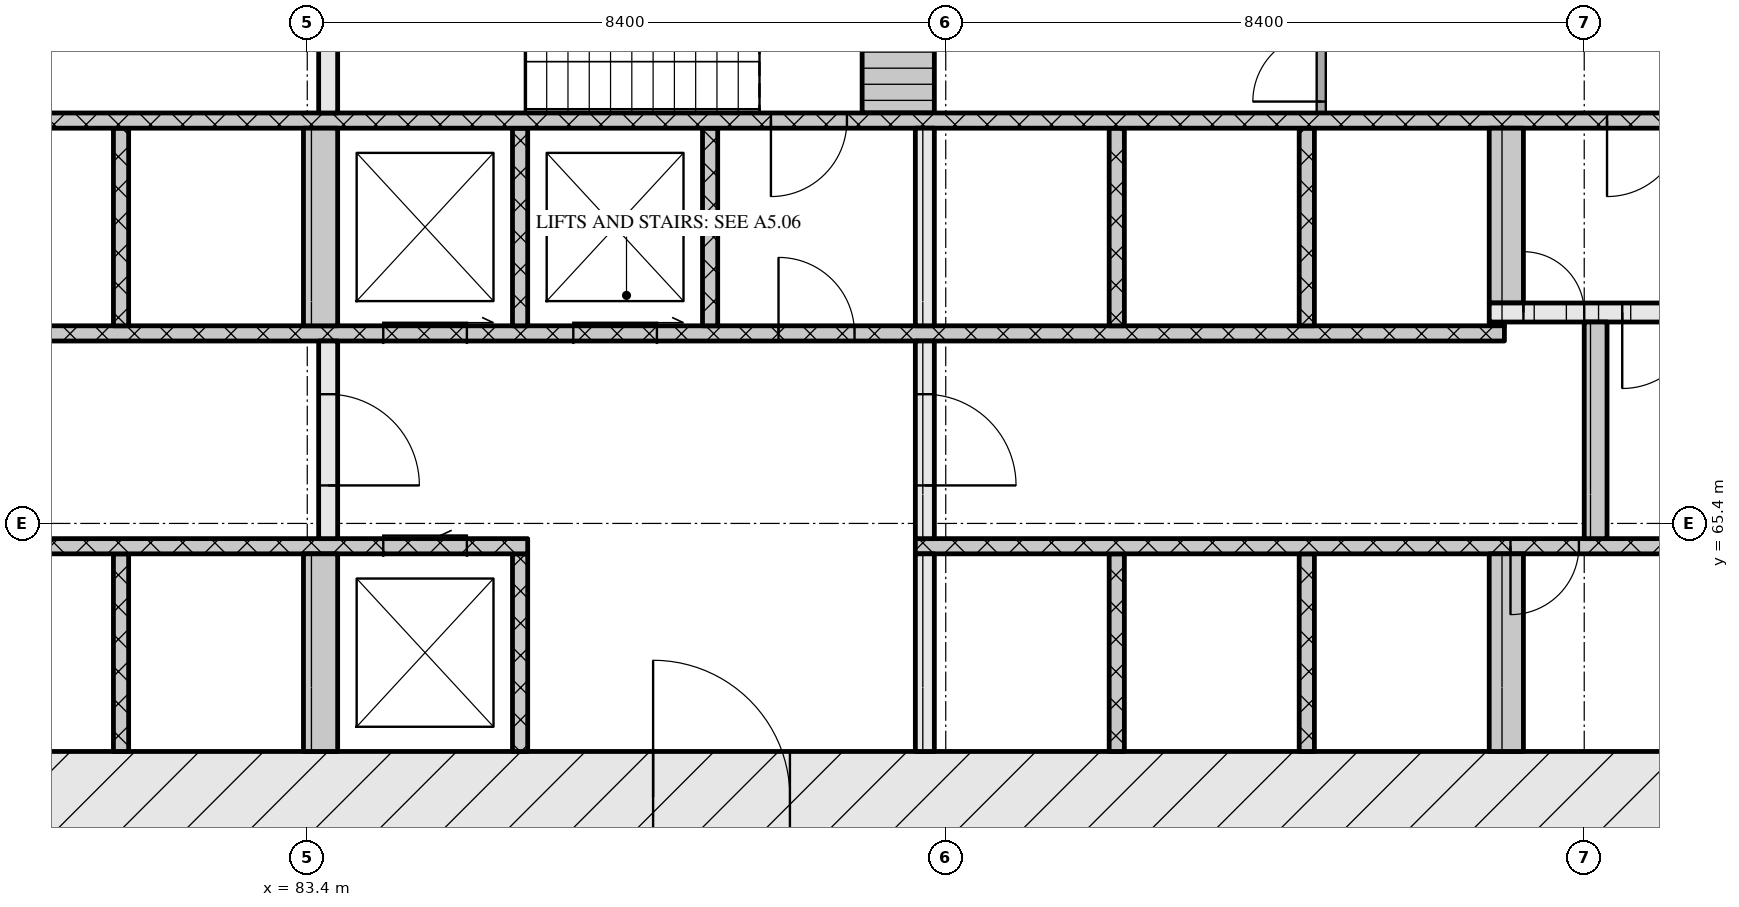
"""IFC4 building model, lengths in metres.
Left out: names, types, materials, properties, quantities, classifications, styles, units other than length and angle.
Written with IfcOpenShell. Run it as: python <this file> out.ifc"""

import sys

from ifc_helpers import new_model, si_unit, direction, frame, frame_2d, origin, place, context, subcontext, project, spatial, rectangle, extrude, element, fill, save


model = new_model("IFC4")
c1 = context("Model", 3, precision=1e-05, world=origin(), true_north=direction((0.0, 1.0)))
c2 = subcontext(c1, "Body", "Model", "MODEL_VIEW")
j1 = project(units=[si_unit("LENGTHUNIT", "METRE"), si_unit("PLANEANGLEUNIT", "RADIAN")], contexts=[c1])
p1 = place(None, origin())
s1 = spatial("IfcSite", under=j1, at=p1, CompositionType="ELEMENT")
p2 = place(p1, origin())
s2 = spatial("IfcBuilding", under=s1, at=p2, CompositionType="ELEMENT")
p3 = place(p2, frame((0.0, 0.0, 23.7)))
s3 = spatial("IfcBuildingStorey", under=s2, at=p3, CompositionType="ELEMENT", Elevation=23.7)
p4 = place(p3, frame((66.6, 61.8, 0.0), z_axis=(0.0, 0.0, 1.0), x_axis=(1.0, 0.0, 0.0)))
e1 = element("IfcWall", 1, at=p4, inside=s3, PredefinedType="SOLIDWALL", context=c2, shape_type="SweptSolid", body=[
    extrude(rectangle(XDim=42.0, YDim=1.2, at=frame_2d((21.0, 0.0))), origin(), (0.0, 0.0, 1.0), 4.2),
])
p5 = place(p4, frame((21.35, 0.0, 0.0)))
e2 = element("IfcOpeningElement", 2, at=p5, cuts=e1, PredefinedType="OPENING", context=c2, shape_type="SweptSolid", body=[
    extrude(rectangle(XDim=1.8, YDim=2.1, at=frame_2d((0.9, 1.05))), frame((0.0, 0.61, 0.0), z_axis=(0.0, -1.0, 0.0), x_axis=(1.0, 0.0, 0.0)), (0.0, 0.0, 1.0), 1.22),
])
p6 = place(p3, frame((80.95, 62.4, 0.0), z_axis=(0.0, 0.0, 1.0), x_axis=(0.0, 1.0, 0.0)))
e3 = element("IfcWall", 3, at=p6, inside=s3, PredefinedType="SOLIDWALL", context=c2, shape_type="SweptSolid", body=[
    extrude(rectangle(XDim=2.6, YDim=0.2, at=frame_2d((1.3, 0.0))), origin(), (0.0, 0.0, 1.0), 4.2),
])
p7 = place(p3, frame((83.575, 62.4, 0.0), z_axis=(0.0, 0.0, 1.0), x_axis=(0.0, 1.0, 0.0)))
e4 = element("IfcWall", 4, at=p7, inside=s3, PredefinedType="SOLIDWALL", context=c2, shape_type="SweptSolid", body=[
    extrude(rectangle(XDim=2.6, YDim=0.45, at=frame_2d((1.3, 0.0))), origin(), (0.0, 0.0, 1.0), 4.2),
])
p8 = place(p3, frame((86.2, 62.4, 0.0), z_axis=(0.0, 0.0, 1.0), x_axis=(0.0, 1.0, 0.0)))
e5 = element("IfcWall", 5, at=p8, inside=s3, PredefinedType="SOLIDWALL", context=c2, shape_type="SweptSolid", body=[
    extrude(rectangle(XDim=2.6, YDim=0.2, at=frame_2d((1.3, 0.0))), origin(), (0.0, 0.0, 1.0), 4.2),
])
p9 = place(p3, frame((91.525, 62.4, 0.0), z_axis=(0.0, 0.0, 1.0), x_axis=(0.0, 1.0, 0.0)))
e6 = element("IfcWall", 6, at=p9, inside=s3, PredefinedType="SOLIDWALL", context=c2, shape_type="SweptSolid", body=[
    extrude(rectangle(XDim=2.6, YDim=0.25, at=frame_2d((1.3, 0.0))), origin(), (0.0, 0.0, 1.0), 4.2),
])
for number, where, z_axis, x_axis in (
    (7, (94.05, 62.4, 0.0), (0.0, 0.0, 1.0), (0.0, 1.0, 0.0)),
    (8, (96.55, 62.4, 0.0), (0.0, 0.0, 1.0), (0.0, 1.0, 0.0)),
):
    element("IfcWall", number, at=place(p3, frame(where, z_axis=z_axis, x_axis=x_axis)), inside=s3, PredefinedType="SOLIDWALL", context=c2, shape_type="SweptSolid", body=[
        extrude(rectangle(XDim=2.6, YDim=0.2, at=frame_2d((1.3, 0.0))), origin(), (0.0, 0.0, 1.0), 4.2),
    ])
p10 = place(p3, frame((99.175, 62.4, 0.0), z_axis=(0.0, 0.0, 1.0), x_axis=(0.0, 1.0, 0.0)))
e9 = element("IfcWall", 9, at=p10, inside=s3, PredefinedType="SOLIDWALL", context=c2, shape_type="SweptSolid", body=[
    extrude(rectangle(XDim=2.6, YDim=0.45, at=frame_2d((1.3, 0.0))), origin(), (0.0, 0.0, 1.0), 4.2),
])
p11 = place(p3, frame((67.8, 65.1, 0.0), z_axis=(0.0, 0.0, 1.0), x_axis=(1.0, 0.0, 0.0)))
e10 = element("IfcWall", 10, at=p11, inside=s3, PredefinedType="SOLIDWALL", context=c2, shape_type="SweptSolid", body=[
    extrude(rectangle(XDim=18.5, YDim=0.2, at=frame_2d((9.25, 0.0))), origin(), (0.0, 0.0, 1.0), 4.2),
])
p12 = place(p11, frame((7.27, 0.0, 0.0)))
e11 = element("IfcOpeningElement", 11, at=p12, cuts=e10, PredefinedType="OPENING", context=c2, shape_type="SweptSolid", body=[
    extrude(rectangle(XDim=0.9, YDim=2.1, at=frame_2d((0.45, 1.05))), frame((0.0, 0.11, 0.0), z_axis=(0.0, -1.0, 0.0), x_axis=(1.0, 0.0, 0.0)), (0.0, 0.0, 1.0), 0.22),
])
p13 = place(p11, frame((16.6, 0.0, 0.0)))
e12 = element("IfcOpeningElement", 12, at=p13, cuts=e10, PredefinedType="OPENING", context=c2, shape_type="SweptSolid", body=[
    extrude(rectangle(XDim=1.1, YDim=2.1, at=frame_2d((0.55, 1.05))), frame((0.0, 0.11, 0.0), z_axis=(0.0, -1.0, 0.0), x_axis=(1.0, 0.0, 0.0)), (0.0, 0.0, 1.0), 0.22),
])
p14 = place(p3, frame((91.4, 65.1, 0.0), z_axis=(0.0, 0.0, 1.0), x_axis=(1.0, 0.0, 0.0)))
e13 = element("IfcWall", 13, at=p14, inside=s3, PredefinedType="SOLIDWALL", context=c2, shape_type="SweptSolid", body=[
    extrude(rectangle(XDim=16.0, YDim=0.2, at=frame_2d((8.0, 0.0))), origin(), (0.0, 0.0, 1.0), 4.2),
])
p15 = place(p14, frame((7.83, 0.0, 0.0)))
e14 = element("IfcOpeningElement", 14, at=p15, cuts=e13, PredefinedType="OPENING", context=c2, shape_type="SweptSolid", body=[
    extrude(rectangle(XDim=0.9, YDim=2.1, at=frame_2d((0.45, 1.05))), frame((0.0, 0.11, 0.0), z_axis=(0.0, -1.0, 0.0), x_axis=(1.0, 0.0, 0.0)), (0.0, 0.0, 1.0), 0.22),
])
p16 = place(p3, frame((83.675, 65.2, 0.0), z_axis=(0.0, 0.0, 1.0), x_axis=(0.0, 1.0, 0.0)))
e15 = element("IfcWall", 15, at=p16, inside=s3, PredefinedType="SOLIDWALL", context=c2, shape_type="SweptSolid", body=[
    extrude(rectangle(XDim=2.6, YDim=0.25, at=frame_2d((1.3, 0.0))), origin(), (0.0, 0.0, 1.0), 4.2),
])
p17 = place(p16, frame((0.7, 0.0, 0.0)))
e16 = element("IfcOpeningElement", 16, at=p17, cuts=e15, PredefinedType="OPENING", context=c2, shape_type="SweptSolid", body=[
    extrude(rectangle(XDim=1.2, YDim=2.1, at=frame_2d((0.6, 1.05))), frame((0.0, 0.135, 0.0), z_axis=(0.0, -1.0, 0.0), x_axis=(1.0, 0.0, 0.0)), (0.0, 0.0, 1.0), 0.27),
])
p18 = place(p3, frame((91.525, 65.2, 0.0), z_axis=(0.0, 0.0, 1.0), x_axis=(0.0, 1.0, 0.0)))
e17 = element("IfcWall", 17, at=p18, inside=s3, PredefinedType="SOLIDWALL", context=c2, shape_type="SweptSolid", body=[
    extrude(rectangle(XDim=2.6, YDim=0.25, at=frame_2d((1.3, 0.0))), origin(), (0.0, 0.0, 1.0), 4.2),
])
p19 = place(p18, frame((0.7, 0.0, 0.0)))
e18 = element("IfcOpeningElement", 18, at=p19, cuts=e17, PredefinedType="OPENING", context=c2, shape_type="SweptSolid", body=[
    extrude(rectangle(XDim=1.2, YDim=2.1, at=frame_2d((0.6, 1.05))), frame((0.0, 0.135, 0.0), z_axis=(0.0, -1.0, 0.0), x_axis=(1.0, 0.0, 0.0)), (0.0, 0.0, 1.0), 0.27),
])
p20 = place(p3, frame((100.35, 65.2, 0.0), z_axis=(0.0, 0.0, 1.0), x_axis=(0.0, 1.0, 0.0)))
e19 = element("IfcWall", 19, at=p20, inside=s3, PredefinedType="SOLIDWALL", context=c2, shape_type="SweptSolid", body=[
    extrude(rectangle(XDim=2.85, YDim=0.3, at=frame_2d((1.425, 0.0))), origin(), (0.0, 0.0, 1.0), 4.2),
])
p21 = place(p3, frame((76.05, 67.9, 0.0), z_axis=(0.0, 0.0, 1.0), x_axis=(1.0, 0.0, 0.0)))
e20 = element("IfcWall", 20, at=p21, inside=s3, PredefinedType="SOLIDWALL", context=c2, shape_type="SweptSolid", body=[
    extrude(rectangle(XDim=23.1, YDim=0.2, at=frame_2d((11.55, 0.0))), origin(), (0.0, 0.0, 1.0), 4.2),
])
p22 = place(p21, frame((8.35, 0.0, 0.0)))
e21 = element("IfcOpeningElement", 21, at=p22, cuts=e20, PredefinedType="OPENING", context=c2, shape_type="SweptSolid", body=[
    extrude(rectangle(XDim=1.1, YDim=2.1, at=frame_2d((0.55, 1.05))), frame((0.0, 0.11, 0.0), z_axis=(0.0, -1.0, 0.0), x_axis=(1.0, 0.0, 0.0)), (0.0, 0.0, 1.0), 0.22),
])
p23 = place(p21, frame((10.85, 0.0, 0.0)))
e22 = element("IfcOpeningElement", 22, at=p23, cuts=e20, PredefinedType="OPENING", context=c2, shape_type="SweptSolid", body=[
    extrude(rectangle(XDim=1.1, YDim=2.1, at=frame_2d((0.55, 1.05))), frame((0.0, 0.11, 0.0), z_axis=(0.0, -1.0, 0.0), x_axis=(1.0, 0.0, 0.0)), (0.0, 0.0, 1.0), 0.22),
])
p24 = place(p21, frame((13.55, 0.0, 0.0)))
e23 = element("IfcOpeningElement", 23, at=p24, cuts=e20, PredefinedType="OPENING", context=c2, shape_type="SweptSolid", body=[
    extrude(rectangle(XDim=1.0, YDim=2.1, at=frame_2d((0.5, 1.05))), frame((0.0, 0.11, 0.0), z_axis=(0.0, -1.0, 0.0), x_axis=(1.0, 0.0, 0.0)), (0.0, 0.0, 1.0), 0.22),
])
p25 = place(p3, frame((80.95, 68.0, 0.0), z_axis=(0.0, 0.0, 1.0), x_axis=(0.0, 1.0, 0.0)))
e24 = element("IfcWall", 24, at=p25, inside=s3, PredefinedType="SOLIDWALL", context=c2, shape_type="SweptSolid", body=[
    extrude(rectangle(XDim=2.6, YDim=0.2, at=frame_2d((1.3, 0.0))), origin(), (0.0, 0.0, 1.0), 4.2),
])
p26 = place(p3, frame((83.575, 68.0, 0.0), z_axis=(0.0, 0.0, 1.0), x_axis=(0.0, 1.0, 0.0)))
e25 = element("IfcWall", 25, at=p26, inside=s3, PredefinedType="SOLIDWALL", context=c2, shape_type="SweptSolid", body=[
    extrude(rectangle(XDim=2.6, YDim=0.45, at=frame_2d((1.3, 0.0))), origin(), (0.0, 0.0, 1.0), 4.2),
])
for number, where, z_axis, x_axis in (
    (26, (86.2, 68.0, 0.0), (0.0, 0.0, 1.0), (0.0, 1.0, 0.0)),
    (27, (88.7, 68.0, 0.0), (0.0, 0.0, 1.0), (0.0, 1.0, 0.0)),
):
    element("IfcWall", number, at=place(p3, frame(where, z_axis=z_axis, x_axis=x_axis)), inside=s3, PredefinedType="SOLIDWALL", context=c2, shape_type="SweptSolid", body=[
        extrude(rectangle(XDim=2.6, YDim=0.2, at=frame_2d((1.3, 0.0))), origin(), (0.0, 0.0, 1.0), 4.2),
    ])
p27 = place(p3, frame((91.525, 68.0, 0.0), z_axis=(0.0, 0.0, 1.0), x_axis=(0.0, 1.0, 0.0)))
e28 = element("IfcWall", 28, at=p27, inside=s3, PredefinedType="SOLIDWALL", context=c2, shape_type="SweptSolid", body=[
    extrude(rectangle(XDim=2.6, YDim=0.25, at=frame_2d((1.3, 0.0))), origin(), (0.0, 0.0, 1.0), 4.2),
])
for number, where, z_axis, x_axis in (
    (29, (94.05, 68.0, 0.0), (0.0, 0.0, 1.0), (0.0, 1.0, 0.0)),
    (30, (96.55, 68.0, 0.0), (0.0, 0.0, 1.0), (0.0, 1.0, 0.0)),
):
    element("IfcWall", number, at=place(p3, frame(where, z_axis=z_axis, x_axis=x_axis)), inside=s3, PredefinedType="SOLIDWALL", context=c2, shape_type="SweptSolid", body=[
        extrude(rectangle(XDim=2.6, YDim=0.2, at=frame_2d((1.3, 0.0))), origin(), (0.0, 0.0, 1.0), 4.2),
    ])
p28 = place(p3, frame((98.95, 68.025, 0.0), z_axis=(0.0, 0.0, 1.0), x_axis=(1.0, 0.0, 0.0)))
e31 = element("IfcWall", 31, at=p28, inside=s3, PredefinedType="SOLIDWALL", context=c2, shape_type="SweptSolid", body=[
    extrude(rectangle(XDim=0.2, YDim=0.05, at=frame_2d((0.1, 0.0))), origin(), (0.0, 0.0, 1.0), 4.2),
])
p29 = place(p3, frame((98.95, 68.175, 0.0), z_axis=(0.0, 0.0, 1.0), x_axis=(1.0, 0.0, 0.0)))
e32 = element("IfcWall", 32, at=p29, inside=s3, PredefinedType="SOLIDWALL", context=c2, shape_type="SweptSolid", body=[
    extrude(rectangle(XDim=8.45, YDim=0.25, at=frame_2d((4.225, 0.0))), origin(), (0.0, 0.0, 1.0), 4.2),
])
p30 = place(p29, frame((0.45, 0.0, 0.0)))
e33 = element("IfcOpeningElement", 33, at=p30, cuts=e32, PredefinedType="OPENING", context=c2, shape_type="SweptSolid", body=[
    extrude(rectangle(XDim=0.8, YDim=2.1, at=frame_2d((0.4, 1.05))), frame((0.0, 0.135, 0.0), z_axis=(0.0, -1.0, 0.0), x_axis=(1.0, 0.0, 0.0)), (0.0, 0.0, 1.0), 0.27),
])
p31 = place(p29, frame((1.75, 0.0, 0.0)))
e34 = element("IfcOpeningElement", 34, at=p31, cuts=e32, PredefinedType="OPENING", context=c2, shape_type="SweptSolid", body=[
    extrude(rectangle(XDim=1.0, YDim=2.1, at=frame_2d((0.5, 1.05))), frame((0.0, 0.135, 0.0), z_axis=(0.0, -1.0, 0.0), x_axis=(1.0, 0.0, 0.0)), (0.0, 0.0, 1.0), 0.27),
])
p32 = place(p3, frame((99.175, 68.3, 0.0), z_axis=(0.0, 0.0, 1.0), x_axis=(0.0, 1.0, 0.0)))
e35 = element("IfcWall", 35, at=p32, inside=s3, PredefinedType="SOLIDWALL", context=c2, shape_type="SweptSolid", body=[
    extrude(rectangle(XDim=2.3, YDim=0.45, at=frame_2d((1.15, 0.0))), origin(), (0.0, 0.0, 1.0), 4.2),
])
p33 = place(p3, frame((67.8, 70.7, 0.0), z_axis=(0.0, 0.0, 1.0), x_axis=(1.0, 0.0, 0.0)))
e36 = element("IfcWall", 36, at=p33, inside=s3, PredefinedType="SOLIDWALL", context=c2, shape_type="SweptSolid", body=[
    extrude(rectangle(XDim=39.6, YDim=0.2, at=frame_2d((19.8, 0.0))), origin(), (0.0, 0.0, 1.0), 4.2),
])
p34 = place(p33, frame((0.65, 0.0, 0.0)))
e37 = element("IfcOpeningElement", 37, at=p34, cuts=e36, PredefinedType="OPENING", context=c2, shape_type="SweptSolid", body=[
    extrude(rectangle(XDim=1.1, YDim=2.1, at=frame_2d((0.55, 1.05))), frame((0.0, 0.11, 0.0), z_axis=(0.0, -1.0, 0.0), x_axis=(1.0, 0.0, 0.0)), (0.0, 0.0, 1.0), 0.22),
])
p35 = place(p33, frame((3.25, 0.0, 0.0)))
e38 = element("IfcOpeningElement", 38, at=p35, cuts=e36, PredefinedType="OPENING", context=c2, shape_type="SweptSolid", body=[
    extrude(rectangle(XDim=1.1, YDim=2.1, at=frame_2d((0.55, 1.05))), frame((0.0, 0.11, 0.0), z_axis=(0.0, -1.0, 0.0), x_axis=(1.0, 0.0, 0.0)), (0.0, 0.0, 1.0), 0.22),
])
p36 = place(p33, frame((5.9, 0.0, 0.0)))
e39 = element("IfcOpeningElement", 39, at=p36, cuts=e36, PredefinedType="OPENING", context=c2, shape_type="SweptSolid", body=[
    extrude(rectangle(XDim=1.0, YDim=2.1, at=frame_2d((0.5, 1.05))), frame((0.0, 0.11, 0.0), z_axis=(0.0, -1.0, 0.0), x_axis=(1.0, 0.0, 0.0)), (0.0, 0.0, 1.0), 0.22),
])
p37 = place(p33, frame((21.7, 0.0, 0.0)))
e40 = element("IfcOpeningElement", 40, at=p37, cuts=e36, PredefinedType="OPENING", context=c2, shape_type="SweptSolid", body=[
    extrude(rectangle(XDim=1.0, YDim=2.1, at=frame_2d((0.5, 1.05))), frame((0.0, 0.11, 0.0), z_axis=(0.0, -1.0, 0.0), x_axis=(1.0, 0.0, 0.0)), (0.0, 0.0, 1.0), 0.22),
])
p38 = place(p33, frame((32.7, 0.0, 0.0)))
e41 = element("IfcOpeningElement", 41, at=p38, cuts=e36, PredefinedType="OPENING", context=c2, shape_type="SweptSolid", body=[
    extrude(rectangle(XDim=1.0, YDim=2.1, at=frame_2d((0.5, 1.05))), frame((0.0, 0.11, 0.0), z_axis=(0.0, -1.0, 0.0), x_axis=(1.0, 0.0, 0.0)), (0.0, 0.0, 1.0), 0.22),
])
p39 = place(p33, frame((35.25, 0.0, 0.0)))
e42 = element("IfcOpeningElement", 42, at=p39, cuts=e36, PredefinedType="OPENING", context=c2, shape_type="SweptSolid", body=[
    extrude(rectangle(XDim=1.1, YDim=2.1, at=frame_2d((0.55, 1.05))), frame((0.0, 0.11, 0.0), z_axis=(0.0, -1.0, 0.0), x_axis=(1.0, 0.0, 0.0)), (0.0, 0.0, 1.0), 0.22),
])
p40 = place(p33, frame((37.85, 0.0, 0.0)))
e43 = element("IfcOpeningElement", 43, at=p40, cuts=e36, PredefinedType="OPENING", context=c2, shape_type="SweptSolid", body=[
    extrude(rectangle(XDim=1.1, YDim=2.1, at=frame_2d((0.55, 1.05))), frame((0.0, 0.11, 0.0), z_axis=(0.0, -1.0, 0.0), x_axis=(1.0, 0.0, 0.0)), (0.0, 0.0, 1.0), 0.22),
])
p41 = place(p3, frame((83.675, 70.8, 0.0), z_axis=(0.0, 0.0, 1.0), x_axis=(0.0, 1.0, 0.0)))
e44 = element("IfcWall", 44, at=p41, inside=s3, PredefinedType="SOLIDWALL", context=c2, shape_type="SweptSolid", body=[
    extrude(rectangle(XDim=1.2, YDim=0.25, at=frame_2d((0.6, 0.0))), origin(), (0.0, 0.0, 1.0), 4.2),
])
p42 = place(p3, frame((91.175, 70.8, 0.0), z_axis=(0.0, 0.0, 1.0), x_axis=(0.0, 1.0, 0.0)))
e45 = element("IfcWall", 45, at=p42, inside=s3, PredefinedType="SOLIDWALL", context=c2, shape_type="SweptSolid", body=[
    extrude(rectangle(XDim=2.95, YDim=0.95, at=frame_2d((1.475, 0.0))), origin(), (0.0, 0.0, 1.0), 4.2),
])
p43 = place(p3, frame((96.74, 70.8, 0.0), z_axis=(0.0, 0.0, 1.0), x_axis=(0.0, 1.0, 0.0)))
e46 = element("IfcWall", 46, at=p43, inside=s3, PredefinedType="PARTITIONING", context=c2, shape_type="SweptSolid", body=[
    extrude(rectangle(XDim=1.2, YDim=0.12, at=frame_2d((0.6, 0.0))), origin(), (0.0, 0.0, 1.0), 4.2),
])
p44 = place(p43, frame((0.15, 0.0, 0.0)))
e47 = element("IfcOpeningElement", 47, at=p44, cuts=e46, PredefinedType="OPENING", context=c2, shape_type="SweptSolid", body=[
    extrude(rectangle(XDim=0.9, YDim=2.1, at=frame_2d((0.45, 1.05))), frame((0.0, 0.07, 0.0), z_axis=(0.0, -1.0, 0.0), x_axis=(1.0, 0.0, 0.0)), (0.0, 0.0, 1.0), 0.14),
])
p45 = place(p5, origin())
e48 = element("IfcDoor", 48, at=p45, inside=s3, OperationType="DOUBLE_DOOR_SINGLE_SWING", PredefinedType="DOOR", context=c2, shape_type="SweptSolid", body=[
    extrude(rectangle(XDim=1.8, YDim=2.1, at=frame_2d((0.9, 1.05))), frame((0.0, 0.025, 0.0), z_axis=(0.0, -1.0, 0.0), x_axis=(1.0, 0.0, 0.0)), (0.0, 0.0, 1.0), 0.05),
])
fill(e2, e48)
p46 = place(p13, origin())
e49 = element("IfcDoor", 49, at=p46, inside=s3, OperationType="SLIDING_TO_LEFT", PredefinedType="DOOR", context=c2, shape_type="SweptSolid", body=[
    extrude(rectangle(XDim=1.1, YDim=2.1, at=frame_2d((0.55, 1.05))), frame((0.0, 0.025, 0.0), z_axis=(0.0, -1.0, 0.0), x_axis=(1.0, 0.0, 0.0)), (0.0, 0.0, 1.0), 0.05),
])
fill(e12, e49)
p47 = place(p15, origin())
e50 = element("IfcDoor", 50, at=p47, inside=s3, OperationType="SINGLE_SWING_RIGHT", PredefinedType="DOOR", context=c2, shape_type="SweptSolid", body=[
    extrude(rectangle(XDim=0.9, YDim=2.1, at=frame_2d((0.45, 1.05))), frame((0.0, 0.025, 0.0), z_axis=(0.0, -1.0, 0.0), x_axis=(1.0, 0.0, 0.0)), (0.0, 0.0, 1.0), 0.05),
])
fill(e14, e50)
p48 = place(p17, origin())
e51 = element("IfcDoor", 51, at=p48, inside=s3, OperationType="SINGLE_SWING_RIGHT", PredefinedType="DOOR", context=c2, shape_type="SweptSolid", body=[
    extrude(rectangle(XDim=1.2, YDim=2.1, at=frame_2d((0.6, 1.05))), frame((0.0, 0.025, 0.0), z_axis=(0.0, -1.0, 0.0), x_axis=(1.0, 0.0, 0.0)), (0.0, 0.0, 1.0), 0.05),
])
fill(e16, e51)
p49 = place(p19, origin())
e52 = element("IfcDoor", 52, at=p49, inside=s3, OperationType="SINGLE_SWING_RIGHT", PredefinedType="DOOR", context=c2, shape_type="SweptSolid", body=[
    extrude(rectangle(XDim=1.2, YDim=2.1, at=frame_2d((0.6, 1.05))), frame((0.0, 0.025, 0.0), z_axis=(0.0, -1.0, 0.0), x_axis=(1.0, 0.0, 0.0)), (0.0, 0.0, 1.0), 0.05),
])
fill(e18, e52)
p50 = place(p22, origin())
e53 = element("IfcDoor", 53, at=p50, inside=s3, OperationType="SLIDING_TO_RIGHT", PredefinedType="DOOR", context=c2, shape_type="SweptSolid", body=[
    extrude(rectangle(XDim=1.1, YDim=2.1, at=frame_2d((0.55, 1.05))), frame((0.0, 0.025, 0.0), z_axis=(0.0, -1.0, 0.0), x_axis=(1.0, 0.0, 0.0)), (0.0, 0.0, 1.0), 0.05),
])
fill(e21, e53)
p51 = place(p23, origin())
e54 = element("IfcDoor", 54, at=p51, inside=s3, OperationType="SLIDING_TO_RIGHT", PredefinedType="DOOR", context=c2, shape_type="SweptSolid", body=[
    extrude(rectangle(XDim=1.1, YDim=2.1, at=frame_2d((0.55, 1.05))), frame((0.0, 0.025, 0.0), z_axis=(0.0, -1.0, 0.0), x_axis=(1.0, 0.0, 0.0)), (0.0, 0.0, 1.0), 0.05),
])
fill(e22, e54)
p52 = place(p24, origin())
e55 = element("IfcDoor", 55, at=p52, inside=s3, OperationType="SINGLE_SWING_LEFT", PredefinedType="DOOR", context=c2, shape_type="SweptSolid", body=[
    extrude(rectangle(XDim=1.0, YDim=2.1, at=frame_2d((0.5, 1.05))), frame((0.0, 0.025, 0.0), z_axis=(0.0, -1.0, 0.0), x_axis=(1.0, 0.0, 0.0)), (0.0, 0.0, 1.0), 0.05),
])
fill(e23, e55)
p53 = place(p30, origin())
e56 = element("IfcDoor", 56, at=p53, inside=s3, OperationType="SINGLE_SWING_LEFT", PredefinedType="DOOR", context=c2, shape_type="SweptSolid", body=[
    extrude(rectangle(XDim=0.8, YDim=2.1, at=frame_2d((0.4, 1.05))), frame((0.0, 0.025, 0.0), z_axis=(0.0, -1.0, 0.0), x_axis=(1.0, 0.0, 0.0)), (0.0, 0.0, 1.0), 0.05),
])
fill(e33, e56)
p54 = place(p31, origin())
e57 = element("IfcDoor", 57, at=p54, inside=s3, OperationType="SINGLE_SWING_RIGHT", PredefinedType="DOOR", context=c2, shape_type="SweptSolid", body=[
    extrude(rectangle(XDim=1.0, YDim=2.1, at=frame_2d((0.5, 1.05))), frame((0.0, 0.025, 0.0), z_axis=(0.0, -1.0, 0.0), x_axis=(1.0, 0.0, 0.0)), (0.0, 0.0, 1.0), 0.05),
])
fill(e34, e57)
p55 = place(p37, origin())
e58 = element("IfcDoor", 58, at=p55, inside=s3, OperationType="SINGLE_SWING_RIGHT", PredefinedType="DOOR", context=c2, shape_type="SweptSolid", body=[
    extrude(rectangle(XDim=1.0, YDim=2.1, at=frame_2d((0.5, 1.05))), frame((0.0, 0.025, 0.0), z_axis=(0.0, -1.0, 0.0), x_axis=(1.0, 0.0, 0.0)), (0.0, 0.0, 1.0), 0.05),
])
fill(e40, e58)
p56 = place(p38, origin())
e59 = element("IfcDoor", 59, at=p56, inside=s3, OperationType="SINGLE_SWING_RIGHT", PredefinedType="DOOR", context=c2, shape_type="SweptSolid", body=[
    extrude(rectangle(XDim=1.0, YDim=2.1, at=frame_2d((0.5, 1.05))), frame((0.0, 0.025, 0.0), z_axis=(0.0, -1.0, 0.0), x_axis=(1.0, 0.0, 0.0)), (0.0, 0.0, 1.0), 0.05),
])
fill(e41, e59)
p57 = place(p44, origin())
e60 = element("IfcDoor", 60, at=p57, inside=s3, OperationType="SINGLE_SWING_LEFT", PredefinedType="DOOR", context=c2, shape_type="SweptSolid", body=[
    extrude(rectangle(XDim=0.9, YDim=2.1, at=frame_2d((0.45, 1.05))), frame((0.0, 0.025, 0.0), z_axis=(0.0, -1.0, 0.0), x_axis=(1.0, 0.0, 0.0)), (0.0, 0.0, 1.0), 0.05),
])
fill(e47, e60)
save(model, sys.argv[1])
